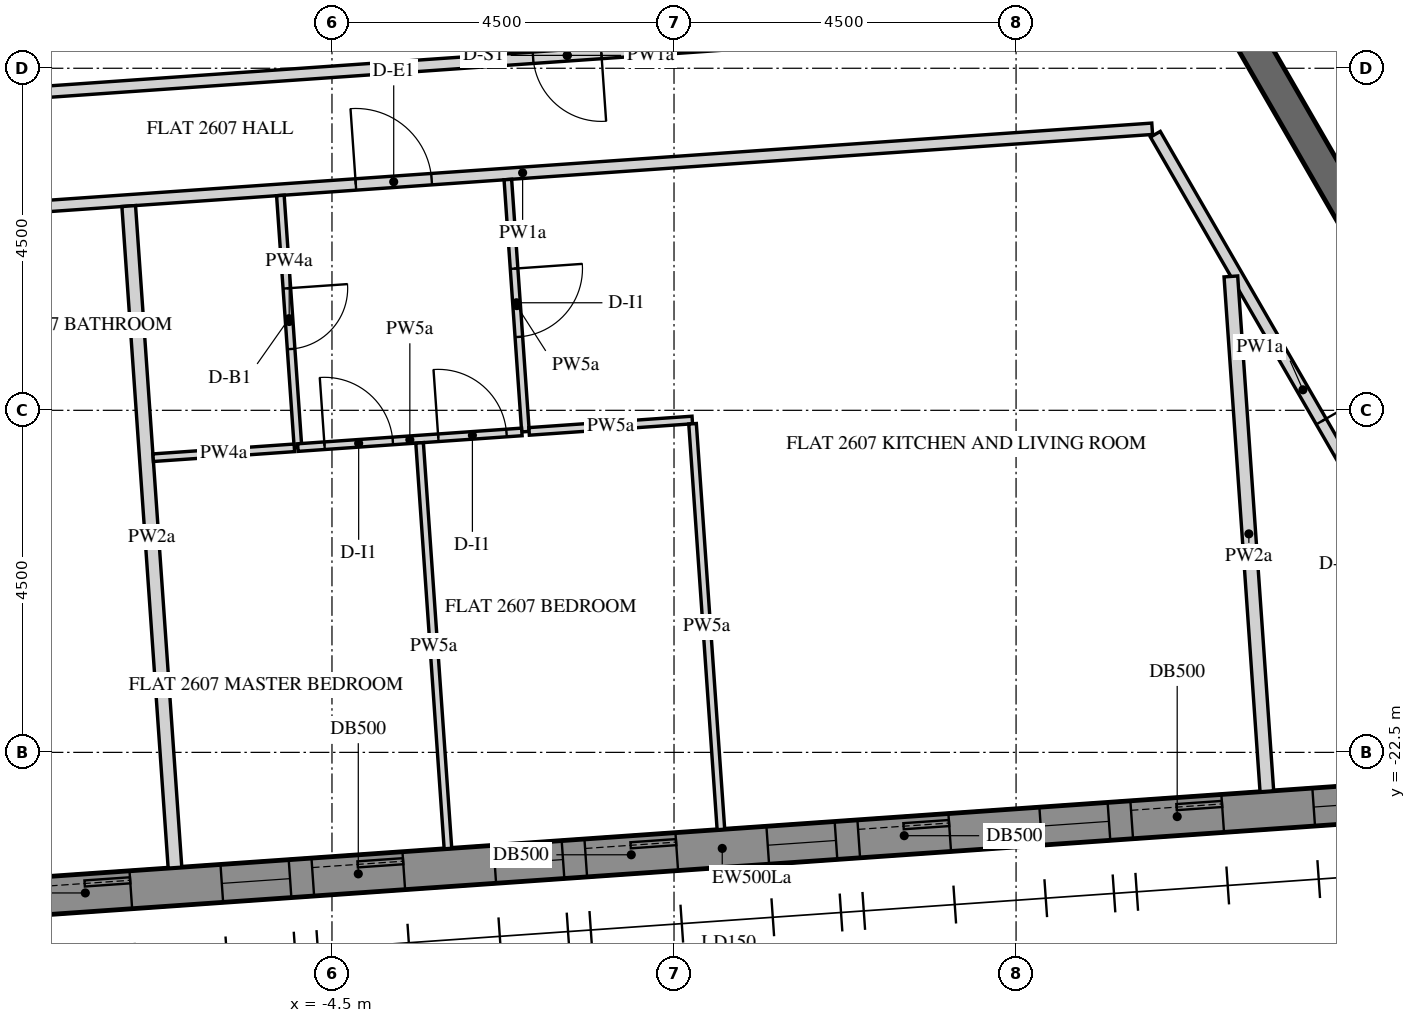
"""IFC4 building model, lengths in metres.
Left out: names, types, materials, properties, quantities, classifications, styles, units other than length and angle.
Written with IfcOpenShell. Run it as: python <this file> out.ifc"""

import sys

from ifc_helpers import new_model, si_unit, direction, frame, frame_2d, origin, place, context, subcontext, project, spatial, polyline, rectangle, outline, extrude, element, fill, save


model = new_model("IFC4")
c1 = context("Model", 3, precision=1e-05, world=origin(), true_north=direction((0.0, 1.0)))
c2 = subcontext(c1, "Body", "Model", "MODEL_VIEW")
j1 = project(units=[si_unit("LENGTHUNIT", "METRE"), si_unit("PLANEANGLEUNIT", "RADIAN")], contexts=[c1])
p1 = place(None, origin())
s1 = spatial("IfcSite", under=j1, at=p1, CompositionType="ELEMENT")
p2 = place(p1, origin())
s2 = spatial("IfcBuilding", under=s1, at=p2, CompositionType="ELEMENT")
p3 = place(p2, frame((0.0, 0.0, 334.2)))
s3 = spatial("IfcBuildingStorey", under=s2, at=p3, CompositionType="ELEMENT", Elevation=334.2)
p4 = place(p3, frame((-10.86, -24.567, -0.15), z_axis=(0.0, 0.0, 1.0), x_axis=(0.997564329317, 0.06975248292, 0.0)))
e1 = element("IfcWall", 1, at=p4, inside=s3, PredefinedType="SOLIDWALL", context=c2, shape_type="SweptSolid", body=[
    extrude(outline(polyline([(0.25, -0.25), (22.795, -0.25), (23.295, 0.25), (-0.25, 0.25), (0.25, -0.25)])), origin(), (0.0, 0.0, 1.0), 3.75),
])
p5 = place(p4, frame((1.323, 0.0, 1.05)))
e2 = element("IfcOpeningElement", 2, at=p5, cuts=e1, PredefinedType="OPENING", context=c2, shape_type="SweptSolid", body=[
    extrude(rectangle(XDim=0.9, YDim=1.5, at=frame_2d((0.45, 0.75))), frame((0.0, 0.26, 0.0), z_axis=(0.0, -1.0, 0.0), x_axis=(1.0, 0.0, 0.0)), (0.0, 0.0, 1.0), 0.52),
])
p6 = place(p4, frame((2.522, 0.0, 0.15)))
e3 = element("IfcOpeningElement", 3, at=p6, cuts=e1, PredefinedType="OPENING", context=c2, shape_type="SweptSolid", body=[
    extrude(rectangle(XDim=1.2, YDim=2.4, at=frame_2d((0.6, 1.2))), frame((0.0, 0.26, 0.0), z_axis=(0.0, -1.0, 0.0), x_axis=(1.0, 0.0, 0.0)), (0.0, 0.0, 1.0), 0.52),
])
p7 = place(p4, frame((4.922, 0.0, 1.05)))
e4 = element("IfcOpeningElement", 4, at=p7, cuts=e1, PredefinedType="OPENING", context=c2, shape_type="SweptSolid", body=[
    extrude(rectangle(XDim=0.9, YDim=1.5, at=frame_2d((0.45, 0.75))), frame((0.0, 0.26, 0.0), z_axis=(0.0, -1.0, 0.0), x_axis=(1.0, 0.0, 0.0)), (0.0, 0.0, 1.0), 0.52),
])
p8 = place(p4, frame((6.122, 0.0, 0.15)))
e5 = element("IfcOpeningElement", 5, at=p8, cuts=e1, PredefinedType="OPENING", context=c2, shape_type="SweptSolid", body=[
    extrude(rectangle(XDim=1.2, YDim=2.4, at=frame_2d((0.6, 1.2))), frame((0.0, 0.26, 0.0), z_axis=(0.0, -1.0, 0.0), x_axis=(1.0, 0.0, 0.0)), (0.0, 0.0, 1.0), 0.52),
])
p9 = place(p4, frame((8.522, 0.0, 1.05)))
e6 = element("IfcOpeningElement", 6, at=p9, cuts=e1, PredefinedType="OPENING", context=c2, shape_type="SweptSolid", body=[
    extrude(rectangle(XDim=0.9, YDim=1.5, at=frame_2d((0.45, 0.75))), frame((0.0, 0.26, 0.0), z_axis=(0.0, -1.0, 0.0), x_axis=(1.0, 0.0, 0.0)), (0.0, 0.0, 1.0), 0.52),
])
p10 = place(p4, frame((9.722, 0.0, 0.15)))
e7 = element("IfcOpeningElement", 7, at=p10, cuts=e1, PredefinedType="OPENING", context=c2, shape_type="SweptSolid", body=[
    extrude(rectangle(XDim=1.2, YDim=2.4, at=frame_2d((0.6, 1.2))), frame((0.0, 0.26, 0.0), z_axis=(0.0, -1.0, 0.0), x_axis=(1.0, 0.0, 0.0)), (0.0, 0.0, 1.0), 0.52),
])
p11 = place(p4, frame((12.122, 0.0, 1.05)))
e8 = element("IfcOpeningElement", 8, at=p11, cuts=e1, PredefinedType="OPENING", context=c2, shape_type="SweptSolid", body=[
    extrude(rectangle(XDim=0.9, YDim=1.5, at=frame_2d((0.45, 0.75))), frame((0.0, 0.26, 0.0), z_axis=(0.0, -1.0, 0.0), x_axis=(1.0, 0.0, 0.0)), (0.0, 0.0, 1.0), 0.52),
])
p12 = place(p4, frame((13.323, 0.0, 0.15)))
e9 = element("IfcOpeningElement", 9, at=p12, cuts=e1, PredefinedType="OPENING", context=c2, shape_type="SweptSolid", body=[
    extrude(rectangle(XDim=1.2, YDim=2.4, at=frame_2d((0.6, 1.2))), frame((0.0, 0.26, 0.0), z_axis=(0.0, -1.0, 0.0), x_axis=(1.0, 0.0, 0.0)), (0.0, 0.0, 1.0), 0.52),
])
p13 = place(p4, frame((15.722, 0.0, 1.05)))
e10 = element("IfcOpeningElement", 10, at=p13, cuts=e1, PredefinedType="OPENING", context=c2, shape_type="SweptSolid", body=[
    extrude(rectangle(XDim=0.9, YDim=1.5, at=frame_2d((0.45, 0.75))), frame((0.0, 0.26, 0.0), z_axis=(0.0, -1.0, 0.0), x_axis=(1.0, 0.0, 0.0)), (0.0, 0.0, 1.0), 0.52),
])
p14 = place(p4, frame((16.922, 0.0, 0.15)))
e11 = element("IfcOpeningElement", 11, at=p14, cuts=e1, PredefinedType="OPENING", context=c2, shape_type="SweptSolid", body=[
    extrude(rectangle(XDim=1.2, YDim=2.4, at=frame_2d((0.6, 1.2))), frame((0.0, 0.26, 0.0), z_axis=(0.0, -1.0, 0.0), x_axis=(1.0, 0.0, 0.0)), (0.0, 0.0, 1.0), 0.52),
])
p15 = place(p4, frame((19.323, 0.0, 1.05)))
e12 = element("IfcOpeningElement", 12, at=p15, cuts=e1, PredefinedType="OPENING", context=c2, shape_type="SweptSolid", body=[
    extrude(rectangle(XDim=0.9, YDim=1.5, at=frame_2d((0.45, 0.75))), frame((0.0, 0.26, 0.0), z_axis=(0.0, -1.0, 0.0), x_axis=(1.0, 0.0, 0.0)), (0.0, 0.0, 1.0), 0.52),
])
p16 = place(p4, frame((20.522, 0.0, 0.15)))
e13 = element("IfcOpeningElement", 13, at=p16, cuts=e1, PredefinedType="OPENING", context=c2, shape_type="SweptSolid", body=[
    extrude(rectangle(XDim=1.2, YDim=2.4, at=frame_2d((0.6, 1.2))), frame((0.0, 0.26, 0.0), z_axis=(0.0, -1.0, 0.0), x_axis=(1.0, 0.0, 0.0)), (0.0, 0.0, 1.0), 0.52),
])
p17 = place(p3, frame((6.351, -11.0, -0.15), z_axis=(0.0, 0.0, 1.0), x_axis=(0.499998894578, -0.866026041999, 0.0)))
e14 = element("IfcWall", 14, at=p17, inside=s3, PredefinedType="SHEAR", context=c2, shape_type="SweptSolid", body=[
    extrude(rectangle(XDim=15.544, YDim=0.4, at=frame_2d((7.772, 0.0))), origin(), (0.0, 0.0, 1.0), 3.75),
])
p18 = place(p17, frame((6.872, 0.0, 0.15)))
e15 = element("IfcOpeningElement", 15, at=p18, cuts=e14, PredefinedType="OPENING", context=c2, shape_type="SweptSolid", body=[
    extrude(rectangle(XDim=1.8, YDim=2.4, at=frame_2d((0.9, 1.2))), frame((0.0, 0.21, 0.0), z_axis=(0.0, -1.0, 0.0), x_axis=(1.0, 0.0, 0.0)), (0.0, 0.0, 1.0), 0.42),
])
p19 = place(p3, frame((-10.274, -15.454, 0.0), z_axis=(0.0, 0.0, 1.0), x_axis=(0.997563645223, 0.069762265797, 0.0)))
e16 = element("IfcWall", 16, at=p19, inside=s3, PredefinedType="PARTITIONING", context=c2, shape_type="SweptSolid", body=[
    extrude(rectangle(XDim=16.606, YDim=0.15, at=frame_2d((8.303, 0.0))), origin(), (0.0, 0.0, 1.0), 2.838),
])
p20 = place(p19, frame((6.103, 0.0, 0.0)))
e17 = element("IfcOpeningElement", 17, at=p20, cuts=e16, PredefinedType="OPENING", context=c2, shape_type="SweptSolid", body=[
    extrude(rectangle(XDim=1.0, YDim=2.1, at=frame_2d((0.5, 1.05))), frame((0.0, 0.085, 0.0), z_axis=(0.0, -1.0, 0.0), x_axis=(1.0, 0.0, 0.0)), (0.0, 0.0, 1.0), 0.17),
])
p21 = place(p3, frame((6.333, -14.368, 0.0), z_axis=(0.0, 0.0, 1.0), x_axis=(0.499977396983, -0.866038453249, 0.0)))
e18 = element("IfcWall", 18, at=p21, inside=s3, PredefinedType="PARTITIONING", context=c2, shape_type="SweptSolid", body=[
    extrude(rectangle(XDim=7.764, YDim=0.15, at=frame_2d((3.882, 0.0))), origin(), (0.0, 0.0, 1.0), 2.838),
])
p22 = place(p21, frame((4.364, 0.0, 0.0)))
e19 = element("IfcOpeningElement", 19, at=p22, cuts=e18, PredefinedType="OPENING", context=c2, shape_type="SweptSolid", body=[
    extrude(rectangle(XDim=1.0, YDim=2.1, at=frame_2d((0.5, 1.05))), frame((0.0, 0.085, 0.0), z_axis=(0.0, -1.0, 0.0), x_axis=(1.0, 0.0, 0.0)), (0.0, 0.0, 1.0), 0.17),
])
p23 = place(p3, frame((6.717, -12.762, 0.0), z_axis=(0.0, 0.0, 1.0), x_axis=(-0.99756375843, -0.069760646978, 0.0)))
e20 = element("IfcWall", 20, at=p23, inside=s3, PredefinedType="PARTITIONING", context=c2, shape_type="SweptSolid", body=[
    extrude(rectangle(XDim=16.284, YDim=0.15, at=frame_2d((8.142, 0.0))), origin(), (0.0, 0.0, 1.0), 2.838),
])
p24 = place(p23, frame((7.692, 0.0, 0.0)))
e21 = element("IfcOpeningElement", 21, at=p24, cuts=e20, PredefinedType="OPENING", context=c2, shape_type="SweptSolid", body=[
    extrude(rectangle(XDim=0.9, YDim=2.1, at=frame_2d((0.45, 1.05))), frame((0.0, 0.085, 0.0), z_axis=(0.0, -1.0, 0.0), x_axis=(1.0, 0.0, 0.0)), (0.0, 0.0, 1.0), 0.17),
])
p25 = place(p3, frame((-6.565, -24.017, 0.0), z_axis=(0.0, 0.0, 1.0), x_axis=(-0.06975756604, 0.997563973878, 0.0)))
e22 = element("IfcWall", 22, at=p25, inside=s3, PredefinedType="PARTITIONING", context=c2, shape_type="SweptSolid", body=[
    extrude(rectangle(XDim=8.725, YDim=0.18, at=frame_2d((4.363, 0.0))), origin(), (0.0, 0.0, 1.0), 2.838),
])
p26 = place(p3, frame((-2.186, -14.964, 0.0), z_axis=(0.0, 0.0, 1.0), x_axis=(0.069754598287, -0.997564181403, 0.0)))
e23 = element("IfcWall", 23, at=p26, inside=s3, PredefinedType="PARTITIONING", context=c2, shape_type="SweptSolid", body=[
    extrude(rectangle(XDim=3.325, YDim=0.1, at=frame_2d((1.663, 0.0))), origin(), (0.0, 0.0, 1.0), 2.838),
])
p27 = place(p26, frame((1.175, 0.0, 0.0)))
e24 = element("IfcOpeningElement", 24, at=p27, cuts=e23, PredefinedType="OPENING", context=c2, shape_type="SweptSolid", body=[
    extrude(rectangle(XDim=0.9, YDim=2.1, at=frame_2d((0.45, 1.05))), frame((0.0, 0.06, 0.0), z_axis=(0.0, -1.0, 0.0), x_axis=(1.0, 0.0, 0.0)), (0.0, 0.0, 1.0), 0.12),
])
p28 = place(p3, frame((-1.906, -18.278, 0.0), z_axis=(0.0, 0.0, 1.0), x_axis=(0.997563548072, 0.069763654999, 0.0)))
e25 = element("IfcWall", 25, at=p28, inside=s3, PredefinedType="PARTITIONING", context=c2, shape_type="SweptSolid", body=[
    extrude(rectangle(XDim=2.152, YDim=0.1, at=frame_2d((1.076, 0.0))), origin(), (0.0, 0.0, 1.0), 2.838),
])
p29 = place(p3, frame((0.244, -18.177, 0.0), z_axis=(0.0, 0.0, 1.0), x_axis=(0.069729221413, -0.997565955554, 0.0)))
e26 = element("IfcWall", 26, at=p29, inside=s3, PredefinedType="PARTITIONING", context=c2, shape_type="SweptSolid", body=[
    extrude(rectangle(XDim=5.35, YDim=0.1, at=frame_2d((2.675, 0.0))), origin(), (0.0, 0.0, 1.0), 2.838),
])
p30 = place(p3, frame((7.8, -23.012, 0.0), z_axis=(0.0, 0.0, 1.0), x_axis=(-0.069757205717, 0.997563999075, 0.0)))
e27 = element("IfcWall", 27, at=p30, inside=s3, PredefinedType="PARTITIONING", context=c2, shape_type="SweptSolid", body=[
    extrude(rectangle(XDim=6.79, YDim=0.18, at=frame_2d((3.395, 0.0))), origin(), (0.0, 0.0, 1.0), 2.838),
])
p31 = place(p3, frame((-5.179, -15.173, 0.0), z_axis=(0.0, 0.0, 1.0), x_axis=(0.069754598287, -0.997564181403, 0.0)))
e28 = element("IfcWall", 28, at=p31, inside=s3, PredefinedType="PARTITIONING", context=c2, shape_type="SweptSolid", body=[
    extrude(rectangle(XDim=3.325, YDim=0.1, at=frame_2d((1.663, 0.0))), origin(), (0.0, 0.0, 1.0), 2.838),
])
p32 = place(p31, frame((1.225, 0.0, 0.0)))
e29 = element("IfcOpeningElement", 29, at=p32, cuts=e28, PredefinedType="OPENING", context=c2, shape_type="SweptSolid", body=[
    extrude(rectangle(XDim=0.8, YDim=2.1, at=frame_2d((0.4, 1.05))), frame((0.0, 0.06, 0.0), z_axis=(0.0, -1.0, 0.0), x_axis=(1.0, 0.0, 0.0)), (0.0, 0.0, 1.0), 0.12),
])
p33 = place(p3, frame((-4.949, -18.49, 0.0), z_axis=(0.0, 0.0, 1.0), x_axis=(0.997564145845, 0.069755106801, 0.0)))
e30 = element("IfcWall", 30, at=p33, inside=s3, PredefinedType="PARTITIONING", context=c2, shape_type="SweptSolid", body=[
    extrude(rectangle(XDim=2.954, YDim=0.1, at=frame_2d((1.477, 0.0))), origin(), (0.0, 0.0, 1.0), 2.838),
])
p34 = place(p33, frame((0.352, 0.0, 0.0)))
e31 = element("IfcOpeningElement", 31, at=p34, cuts=e30, PredefinedType="OPENING", context=c2, shape_type="SweptSolid", body=[
    extrude(rectangle(XDim=0.9, YDim=2.1, at=frame_2d((0.45, 1.05))), frame((0.0, 0.06, 0.0), z_axis=(0.0, -1.0, 0.0), x_axis=(1.0, 0.0, 0.0)), (0.0, 0.0, 1.0), 0.12),
])
p35 = place(p33, frame((1.852, 0.0, 0.0)))
e32 = element("IfcOpeningElement", 32, at=p35, cuts=e30, PredefinedType="OPENING", context=c2, shape_type="SweptSolid", body=[
    extrude(rectangle(XDim=0.9, YDim=2.1, at=frame_2d((0.45, 1.05))), frame((0.0, 0.06, 0.0), z_axis=(0.0, -1.0, 0.0), x_axis=(1.0, 0.0, 0.0)), (0.0, 0.0, 1.0), 0.12),
])
p36 = place(p3, frame((-6.852, -18.623, 0.0), z_axis=(0.0, 0.0, 1.0), x_axis=(0.997564079323, 0.069756058123, 0.0)))
e33 = element("IfcWall", 33, at=p36, inside=s3, PredefinedType="PARTITIONING", context=c2, shape_type="SweptSolid", body=[
    extrude(rectangle(XDim=1.862, YDim=0.1, at=frame_2d((0.931, 0.0))), origin(), (0.0, 0.0, 1.0), 2.838),
])
p37 = place(p3, frame((-2.974, -23.765, 0.0), z_axis=(0.0, 0.0, 1.0), x_axis=(-0.069774633622, 0.997562780231, 0.0)))
e34 = element("IfcWall", 34, at=p37, inside=s3, PredefinedType="PARTITIONING", context=c2, shape_type="SweptSolid", body=[
    extrude(rectangle(XDim=5.35, YDim=0.1, at=frame_2d((2.675, 0.0))), origin(), (0.0, 0.0, 1.0), 2.838),
])
p38 = place(p6, frame((0.0, 0.175, 0.0)))
e35 = element("IfcDoor", 35, at=p38, inside=s3, OperationType="SLIDING_TO_LEFT", PredefinedType="DOOR", context=c2, shape_type="SweptSolid", body=[
    extrude(rectangle(XDim=1.2, YDim=2.4, at=frame_2d((0.6, 1.2))), frame((0.0, 0.025, 0.0), z_axis=(0.0, -1.0, 0.0), x_axis=(1.0, 0.0, 0.0)), (0.0, 0.0, 1.0), 0.05),
])
fill(e3, e35)
p39 = place(p7, frame((0.0, 0.18, 0.0)))
e36 = element("IfcWindow", 36, at=p39, inside=s3, PartitioningType="SINGLE_PANEL", PredefinedType="WINDOW", context=c2, shape_type="SweptSolid", body=[
    extrude(rectangle(XDim=0.9, YDim=1.5, at=frame_2d((0.45, 0.75))), frame((0.0, 0.03, 0.0), z_axis=(0.0, -1.0, 0.0), x_axis=(1.0, 0.0, 0.0)), (0.0, 0.0, 1.0), 0.06),
])
fill(e4, e36)
p40 = place(p8, frame((0.0, 0.175, 0.0)))
e37 = element("IfcDoor", 37, at=p40, inside=s3, OperationType="SLIDING_TO_LEFT", PredefinedType="DOOR", context=c2, shape_type="SweptSolid", body=[
    extrude(rectangle(XDim=1.2, YDim=2.4, at=frame_2d((0.6, 1.2))), frame((0.0, 0.025, 0.0), z_axis=(0.0, -1.0, 0.0), x_axis=(1.0, 0.0, 0.0)), (0.0, 0.0, 1.0), 0.05),
])
fill(e5, e37)
p41 = place(p9, frame((0.0, 0.18, 0.0)))
e38 = element("IfcWindow", 38, at=p41, inside=s3, PartitioningType="SINGLE_PANEL", PredefinedType="WINDOW", context=c2, shape_type="SweptSolid", body=[
    extrude(rectangle(XDim=0.9, YDim=1.5, at=frame_2d((0.45, 0.75))), frame((0.0, 0.03, 0.0), z_axis=(0.0, -1.0, 0.0), x_axis=(1.0, 0.0, 0.0)), (0.0, 0.0, 1.0), 0.06),
])
fill(e6, e38)
p42 = place(p10, frame((0.0, 0.175, 0.0)))
e39 = element("IfcDoor", 39, at=p42, inside=s3, OperationType="SLIDING_TO_LEFT", PredefinedType="DOOR", context=c2, shape_type="SweptSolid", body=[
    extrude(rectangle(XDim=1.2, YDim=2.4, at=frame_2d((0.6, 1.2))), frame((0.0, 0.025, 0.0), z_axis=(0.0, -1.0, 0.0), x_axis=(1.0, 0.0, 0.0)), (0.0, 0.0, 1.0), 0.05),
])
fill(e7, e39)
p43 = place(p11, frame((0.0, 0.18, 0.0)))
e40 = element("IfcWindow", 40, at=p43, inside=s3, PartitioningType="SINGLE_PANEL", PredefinedType="WINDOW", context=c2, shape_type="SweptSolid", body=[
    extrude(rectangle(XDim=0.9, YDim=1.5, at=frame_2d((0.45, 0.75))), frame((0.0, 0.03, 0.0), z_axis=(0.0, -1.0, 0.0), x_axis=(1.0, 0.0, 0.0)), (0.0, 0.0, 1.0), 0.06),
])
fill(e8, e40)
p44 = place(p12, frame((0.0, 0.175, 0.0)))
e41 = element("IfcDoor", 41, at=p44, inside=s3, OperationType="SLIDING_TO_LEFT", PredefinedType="DOOR", context=c2, shape_type="SweptSolid", body=[
    extrude(rectangle(XDim=1.2, YDim=2.4, at=frame_2d((0.6, 1.2))), frame((0.0, 0.025, 0.0), z_axis=(0.0, -1.0, 0.0), x_axis=(1.0, 0.0, 0.0)), (0.0, 0.0, 1.0), 0.05),
])
fill(e9, e41)
p45 = place(p13, frame((0.0, 0.18, 0.0)))
e42 = element("IfcWindow", 42, at=p45, inside=s3, PartitioningType="SINGLE_PANEL", PredefinedType="WINDOW", context=c2, shape_type="SweptSolid", body=[
    extrude(rectangle(XDim=0.9, YDim=1.5, at=frame_2d((0.45, 0.75))), frame((0.0, 0.03, 0.0), z_axis=(0.0, -1.0, 0.0), x_axis=(1.0, 0.0, 0.0)), (0.0, 0.0, 1.0), 0.06),
])
fill(e10, e42)
p46 = place(p14, frame((0.0, 0.175, 0.0)))
e43 = element("IfcDoor", 43, at=p46, inside=s3, OperationType="SLIDING_TO_LEFT", PredefinedType="DOOR", context=c2, shape_type="SweptSolid", body=[
    extrude(rectangle(XDim=1.2, YDim=2.4, at=frame_2d((0.6, 1.2))), frame((0.0, 0.025, 0.0), z_axis=(0.0, -1.0, 0.0), x_axis=(1.0, 0.0, 0.0)), (0.0, 0.0, 1.0), 0.05),
])
fill(e11, e43)
p47 = place(p15, frame((0.0, 0.18, 0.0)))
e44 = element("IfcWindow", 44, at=p47, inside=s3, PartitioningType="SINGLE_PANEL", PredefinedType="WINDOW", context=c2, shape_type="SweptSolid", body=[
    extrude(rectangle(XDim=0.9, YDim=1.5, at=frame_2d((0.45, 0.75))), frame((0.0, 0.03, 0.0), z_axis=(0.0, -1.0, 0.0), x_axis=(1.0, 0.0, 0.0)), (0.0, 0.0, 1.0), 0.06),
])
fill(e12, e44)
p48 = place(p20, origin())
e45 = element("IfcDoor", 45, at=p48, inside=s3, OperationType="SINGLE_SWING_RIGHT", PredefinedType="DOOR", context=c2, shape_type="SweptSolid", body=[
    extrude(rectangle(XDim=1.0, YDim=2.1, at=frame_2d((0.5, 1.05))), frame((0.0, 0.025, 0.0), z_axis=(0.0, -1.0, 0.0), x_axis=(1.0, 0.0, 0.0)), (0.0, 0.0, 1.0), 0.05),
])
fill(e17, e45)
p49 = place(p32, origin())
e46 = element("IfcDoor", 46, at=p49, inside=s3, OperationType="SINGLE_SWING_RIGHT", PredefinedType="DOOR", context=c2, shape_type="SweptSolid", body=[
    extrude(rectangle(XDim=0.8, YDim=2.1, at=frame_2d((0.4, 1.05))), frame((0.0, 0.025, 0.0), z_axis=(0.0, -1.0, 0.0), x_axis=(1.0, 0.0, 0.0)), (0.0, 0.0, 1.0), 0.05),
])
fill(e29, e46)
p50 = place(p27, origin())
e47 = element("IfcDoor", 47, at=p50, inside=s3, OperationType="SINGLE_SWING_RIGHT", PredefinedType="DOOR", context=c2, shape_type="SweptSolid", body=[
    extrude(rectangle(XDim=0.9, YDim=2.1, at=frame_2d((0.45, 1.05))), frame((0.0, 0.025, 0.0), z_axis=(0.0, -1.0, 0.0), x_axis=(1.0, 0.0, 0.0)), (0.0, 0.0, 1.0), 0.05),
])
fill(e24, e47)
p51 = place(p34, origin())
e48 = element("IfcDoor", 48, at=p51, inside=s3, OperationType="SINGLE_SWING_RIGHT", PredefinedType="DOOR", context=c2, shape_type="SweptSolid", body=[
    extrude(rectangle(XDim=0.9, YDim=2.1, at=frame_2d((0.45, 1.05))), frame((0.0, 0.025, 0.0), z_axis=(0.0, -1.0, 0.0), x_axis=(1.0, 0.0, 0.0)), (0.0, 0.0, 1.0), 0.05),
])
fill(e31, e48)
p52 = place(p35, origin())
e49 = element("IfcDoor", 49, at=p52, inside=s3, OperationType="SINGLE_SWING_LEFT", PredefinedType="DOOR", context=c2, shape_type="SweptSolid", body=[
    extrude(rectangle(XDim=0.9, YDim=2.1, at=frame_2d((0.45, 1.05))), frame((0.0, 0.025, 0.0), z_axis=(0.0, -1.0, 0.0), x_axis=(1.0, 0.0, 0.0)), (0.0, 0.0, 1.0), 0.05),
])
fill(e32, e49)
p53 = place(p22, origin())
e50 = element("IfcDoor", 50, at=p53, inside=s3, OperationType="SINGLE_SWING_RIGHT", PredefinedType="DOOR", context=c2, shape_type="SweptSolid", body=[
    extrude(rectangle(XDim=1.0, YDim=2.1, at=frame_2d((0.5, 1.05))), frame((0.0, 0.025, 0.0), z_axis=(0.0, -1.0, 0.0), x_axis=(1.0, 0.0, 0.0)), (0.0, 0.0, 1.0), 0.05),
])
fill(e19, e50)
p54 = place(p24, origin())
e51 = element("IfcDoor", 51, at=p54, inside=s3, OperationType="SINGLE_SWING_RIGHT", PredefinedType="DOOR", context=c2, shape_type="SweptSolid", body=[
    extrude(rectangle(XDim=0.9, YDim=2.1, at=frame_2d((0.45, 1.05))), frame((0.0, 0.025, 0.0), z_axis=(0.0, -1.0, 0.0), x_axis=(1.0, 0.0, 0.0)), (0.0, 0.0, 1.0), 0.05),
])
fill(e21, e51)
save(model, sys.argv[1])
